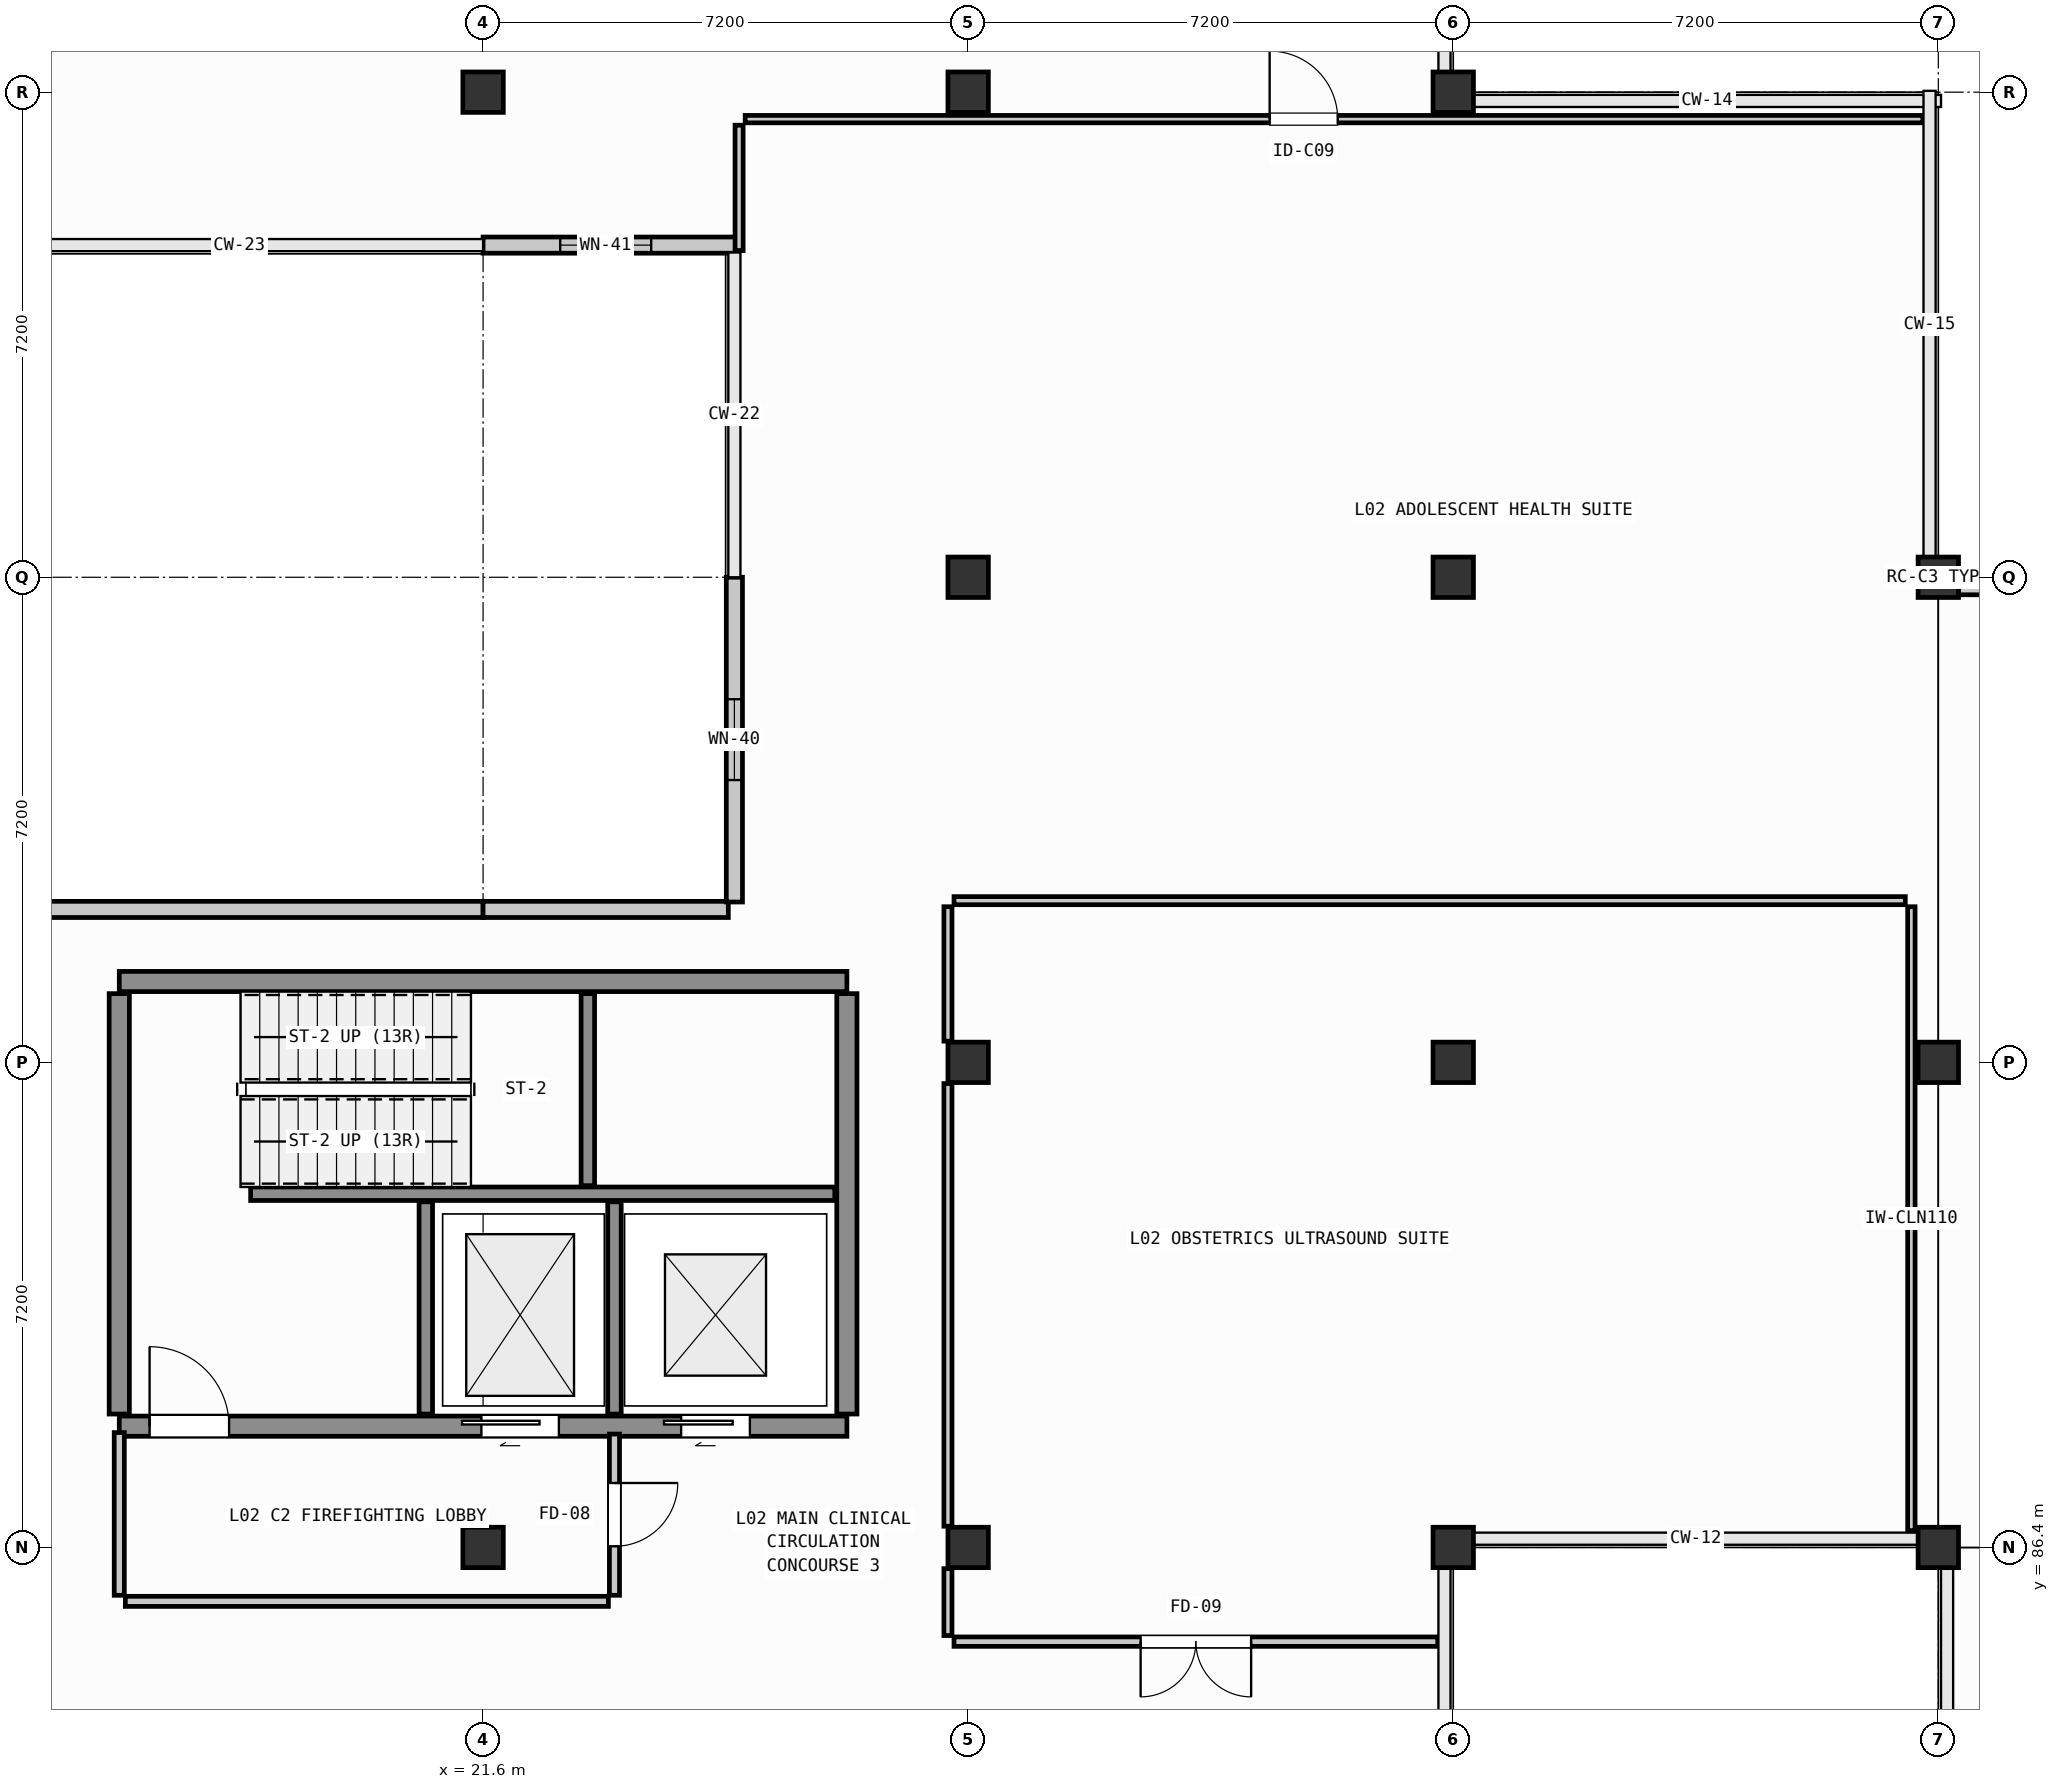
"""IFC4 building model, lengths in metres.
Left out: names, types, materials, properties, quantities, classifications, styles, units other than length and angle.
Written with IfcOpenShell. Run it as: python <this file> out.ifc"""

import sys

from ifc_helpers import new_model, si_unit, direction, frame, frame_2d, origin, origin_2d, place, context, subcontext, project, spatial, rectangle, extrude, element, fill, save


model = new_model("IFC4")
c1 = context("Model", 3, precision=1e-05, world=origin(), true_north=direction((0.0, 1.0)))
c2 = subcontext(c1, "Body", "Model", "MODEL_VIEW")
j1 = project(units=[si_unit("LENGTHUNIT", "METRE"), si_unit("PLANEANGLEUNIT", "RADIAN")], contexts=[c1])
p1 = place(None, origin())
s1 = spatial("IfcSite", under=j1, at=p1, CompositionType="ELEMENT")
p2 = place(p1, origin())
s2 = spatial("IfcBuilding", under=s1, at=p2, CompositionType="ELEMENT")
p3 = place(p2, frame((0.0, 0.0, 4.8)))
s3 = spatial("IfcBuildingStorey", under=s2, at=p3, CompositionType="ELEMENT", Elevation=4.8)
for number, where, z_axis, x_axis in (
    (1, (21.6, 86.4, 0.0), (0.0, 0.0, 1.0), (1.0, 0.0, 0.0)),
    (2, (21.6, 108.0, 0.0), (0.0, 0.0, 1.0), (1.0, 0.0, 0.0)),
    (3, (28.8, 86.4, 0.0), (0.0, 0.0, 1.0), (1.0, 0.0, 0.0)),
    (4, (28.8, 93.6, 0.0), (0.0, 0.0, 1.0), (1.0, 0.0, 0.0)),
    (5, (28.8, 100.8, 0.0), (0.0, 0.0, 1.0), (1.0, 0.0, 0.0)),
    (6, (28.8, 108.0, 0.0), (0.0, 0.0, 1.0), (1.0, 0.0, 0.0)),
    (7, (36.0, 86.4, 0.0), (0.0, 0.0, 1.0), (1.0, 0.0, 0.0)),
    (8, (36.0, 93.6, 0.0), (0.0, 0.0, 1.0), (1.0, 0.0, 0.0)),
    (9, (36.0, 100.8, 0.0), (0.0, 0.0, 1.0), (1.0, 0.0, 0.0)),
    (10, (36.0, 108.0, 0.0), (0.0, 0.0, 1.0), (1.0, 0.0, 0.0)),
    (11, (43.2, 86.4, 0.0), (0.0, 0.0, 1.0), (1.0, 0.0, 0.0)),
    (12, (43.2, 93.6, 0.0), (0.0, 0.0, 1.0), (1.0, 0.0, 0.0)),
    (13, (43.2, 100.8, 0.0), (0.0, 0.0, 1.0), (1.0, 0.0, 0.0)),
):
    element("IfcColumn", number, at=place(p3, frame(where, z_axis=z_axis, x_axis=x_axis)), inside=s3, PredefinedType="COLUMN", context=c2, shape_type="SweptSolid", body=[
        extrude(rectangle(XDim=0.6, YDim=0.6, at=origin_2d()), origin(), (0.0, 0.0, 1.0), 4.2),
    ])
p4 = place(p3, frame((43.495, 100.67, 0.0), z_axis=(0.0, 0.0, 1.0), x_axis=(1.0, 0.0, 0.0)))
e14 = element("IfcWall", 14, at=p4, inside=s3, PredefinedType="SOLIDWALL", context=c2, shape_type="SweptSolid", body=[
    extrude(rectangle(XDim=6.66, YDim=0.26, at=frame_2d((3.33, 0.0))), origin(), (0.0, 0.0, 1.0), 3.0),
])
p5 = place(p4, frame((1.555, 0.0, 2.1)))
e15 = element("IfcOpeningElement", 15, at=p5, cuts=e14, PredefinedType="OPENING", context=c2, shape_type="SweptSolid", body=[
    extrude(rectangle(XDim=1.35, YDim=0.65, at=frame_2d((0.675, 0.325))), frame((0.0, 0.14, 0.0), z_axis=(0.0, -1.0, 0.0), x_axis=(1.0, 0.0, 0.0)), (0.0, 0.0, 1.0), 0.28),
])
p6 = place(p3, frame((14.36, 95.87, 0.0), z_axis=(0.0, 0.0, 1.0), x_axis=(1.0, 0.0, 0.0)))
e16 = element("IfcWall", 16, at=p6, inside=s3, PredefinedType="SOLIDWALL", context=c2, shape_type="SweptSolid", body=[
    extrude(rectangle(XDim=7.24, YDim=0.24, at=frame_2d((3.62, 0.0))), origin(), (0.0, 0.0, 1.0), 3.5),
])
p7 = place(p3, frame((21.6, 95.87, 0.0), z_axis=(0.0, 0.0, 1.0), x_axis=(1.0, 0.0, 0.0)))
e17 = element("IfcWall", 17, at=p7, inside=s3, PredefinedType="SOLIDWALL", context=c2, shape_type="SweptSolid", body=[
    extrude(rectangle(XDim=3.64, YDim=0.24, at=frame_2d((1.82, 0.0))), origin(), (0.0, 0.0, 1.0), 4.2),
])
p8 = place(p3, frame((25.33, 95.98, 0.0), z_axis=(0.0, 0.0, 1.0), x_axis=(0.0, 1.0, 0.0)))
e18 = element("IfcWall", 18, at=p8, inside=s3, PredefinedType="SOLIDWALL", context=c2, shape_type="SweptSolid", body=[
    extrude(rectangle(XDim=4.82, YDim=0.24, at=frame_2d((2.41, 0.0))), origin(), (0.0, 0.0, 1.0), 4.2),
])
p9 = place(p8, frame((1.81, 0.0, 0.95)))
e19 = element("IfcOpeningElement", 19, at=p9, cuts=e18, PredefinedType="OPENING", context=c2, shape_type="SweptSolid", body=[
    extrude(rectangle(XDim=1.2, YDim=1.55, at=frame_2d((0.6, 0.775))), frame((0.0, 0.13, 0.0), z_axis=(0.0, -1.0, 0.0), x_axis=(1.0, 0.0, 0.0)), (0.0, 0.0, 1.0), 0.26),
])
p10 = place(p3, frame((25.351, 105.73, 0.0), z_axis=(0.0, 0.0, 1.0), x_axis=(-1.0, 0.0, 0.0)))
e20 = element("IfcWall", 20, at=p10, inside=s3, PredefinedType="SOLIDWALL", context=c2, shape_type="SweptSolid", body=[
    extrude(rectangle(XDim=3.751, YDim=0.24, at=frame_2d((1.875, 0.0))), origin(), (0.0, 0.0, 1.0), 4.2),
])
p11 = place(p10, frame((1.256, 0.0, 0.95)))
e21 = element("IfcOpeningElement", 21, at=p11, cuts=e20, PredefinedType="OPENING", context=c2, shape_type="SweptSolid", body=[
    extrude(rectangle(XDim=1.35, YDim=1.55, at=frame_2d((0.675, 0.775))), frame((0.0, 0.13, 0.0), z_axis=(0.0, -1.0, 0.0), x_axis=(1.0, 0.0, 0.0)), (0.0, 0.0, 1.0), 0.26),
])
p12 = place(p3, frame((16.2, 88.2, 0.0), z_axis=(0.0, 0.0, 1.0), x_axis=(1.0, 0.0, 0.0)))
e22 = element("IfcWall", 22, at=p12, inside=s3, PredefinedType="SHEAR", context=c2, shape_type="SweptSolid", body=[
    extrude(rectangle(XDim=10.8, YDim=0.3, at=frame_2d((5.4, 0.0))), origin(), (0.0, 0.0, 1.0), 4.5),
])
p13 = place(p12, frame((0.45, 0.0, 0.0)))
e23 = element("IfcOpeningElement", 23, at=p13, cuts=e22, PredefinedType="OPENING", context=c2, shape_type="SweptSolid", body=[
    extrude(rectangle(XDim=1.18, YDim=2.16, at=frame_2d((0.59, 1.08))), frame((0.0, 0.16, 0.0), z_axis=(0.0, -1.0, 0.0), x_axis=(1.0, 0.0, 0.0)), (0.0, 0.0, 1.0), 0.32),
])
p14 = place(p12, frame((5.375, 0.0, 0.0)))
e24 = element("IfcOpeningElement", 24, at=p14, cuts=e22, PredefinedType="OPENING", context=c2, shape_type="SweptSolid", body=[
    extrude(rectangle(XDim=1.15, YDim=2.15, at=frame_2d((0.575, 1.075))), frame((0.0, 0.16, 0.0), z_axis=(0.0, -1.0, 0.0), x_axis=(1.0, 0.0, 0.0)), (0.0, 0.0, 1.0), 0.32),
])
p15 = place(p12, frame((8.34, 0.0, 0.0)))
e25 = element("IfcOpeningElement", 25, at=p15, cuts=e22, PredefinedType="OPENING", context=c2, shape_type="SweptSolid", body=[
    extrude(rectangle(XDim=1.02, YDim=2.12, at=frame_2d((0.51, 1.06))), frame((0.0, 0.16, 0.0), z_axis=(0.0, -1.0, 0.0), x_axis=(1.0, 0.0, 0.0)), (0.0, 0.0, 1.0), 0.32),
])
p16 = place(p3, frame((16.2, 94.8, 0.0), z_axis=(0.0, 0.0, 1.0), x_axis=(1.0, 0.0, 0.0)))
e26 = element("IfcWall", 26, at=p16, inside=s3, PredefinedType="SHEAR", context=c2, shape_type="SweptSolid", body=[
    extrude(rectangle(XDim=10.8, YDim=0.3, at=frame_2d((5.4, 0.0))), origin(), (0.0, 0.0, 1.0), 4.5),
])
for number, where, z_axis, x_axis in (
    (27, (16.2, 88.38, 0.0), (0.0, 0.0, 1.0), (0.0, 1.0, 0.0)),
    (28, (27.0, 88.38, 0.0), (0.0, 0.0, 1.0), (0.0, 1.0, 0.0)),
):
    element("IfcWall", number, at=place(p3, frame(where, z_axis=z_axis, x_axis=x_axis)), inside=s3, PredefinedType="SHEAR", context=c2, shape_type="SweptSolid", body=[
        extrude(rectangle(XDim=6.24, YDim=0.3, at=frame_2d((3.12, 0.0))), origin(), (0.0, 0.0, 1.0), 4.5),
    ])
p17 = place(p3, frame((18.15, 91.65, 0.0), z_axis=(0.0, 0.0, 1.0), x_axis=(1.0, 0.0, 0.0)))
e29 = element("IfcWall", 29, at=p17, inside=s3, PredefinedType="SHEAR", context=c2, shape_type="SweptSolid", body=[
    extrude(rectangle(XDim=8.67, YDim=0.2, at=frame_2d((4.335, 0.0))), origin(), (0.0, 0.0, 1.0), 4.5),
])
p18 = place(p3, frame((23.155, 91.77, 0.0), z_axis=(0.0, 0.0, 1.0), x_axis=(0.0, 1.0, 0.0)))
e30 = element("IfcWall", 30, at=p18, inside=s3, PredefinedType="SHEAR", context=c2, shape_type="SweptSolid", body=[
    extrude(rectangle(XDim=2.85, YDim=0.2, at=frame_2d((1.425, 0.0))), origin(), (0.0, 0.0, 1.0), 4.5),
])
for number, where, z_axis, x_axis in (
    (31, (20.75, 88.38, 0.0), (0.0, 0.0, 1.0), (0.0, 1.0, 0.0)),
    (32, (23.55, 88.38, 0.0), (0.0, 0.0, 1.0), (0.0, 1.0, 0.0)),
):
    element("IfcWall", number, at=place(p3, frame(where, z_axis=z_axis, x_axis=x_axis)), inside=s3, PredefinedType="SHEAR", context=c2, shape_type="SweptSolid", body=[
        extrude(rectangle(XDim=3.15, YDim=0.2, at=frame_2d((1.575, 0.0))), origin(), (0.0, 0.0, 1.0), 4.5),
    ])
p19 = place(p3, frame((16.2, 85.69, 0.0), z_axis=(0.0, 0.0, 1.0), x_axis=(0.0, 1.0, 0.0)))
e33 = element("IfcWall", 33, at=p19, inside=s3, PredefinedType="PARTITIONING", context=c2, shape_type="SweptSolid", body=[
    extrude(rectangle(XDim=2.415, YDim=0.15, at=frame_2d((1.208, 0.0))), origin(), (0.0, 0.0, 1.0), 3.4),
])
p20 = place(p3, frame((23.55, 88.083, 0.0), z_axis=(0.0, 0.0, 1.0), x_axis=(0.0, -1.0, 0.0)))
e34 = element("IfcWall", 34, at=p20, inside=s3, PredefinedType="PARTITIONING", context=c2, shape_type="SweptSolid", body=[
    extrude(rectangle(XDim=2.393, YDim=0.15, at=frame_2d((1.197, 0.0))), origin(), (0.0, 0.0, 1.0), 3.4),
])
p21 = place(p20, frame((0.727, 0.0, 0.0)))
e35 = element("IfcOpeningElement", 35, at=p21, cuts=e34, PredefinedType="OPENING", context=c2, shape_type="SweptSolid", body=[
    extrude(rectangle(XDim=0.94, YDim=2.1, at=frame_2d((0.47, 1.05))), frame((0.0, 0.085, 0.0), z_axis=(0.0, -1.0, 0.0), x_axis=(1.0, 0.0, 0.0)), (0.0, 0.0, 1.0), 0.17),
])
p22 = place(p3, frame((23.46, 85.6, 0.0), z_axis=(0.0, 0.0, 1.0), x_axis=(-1.0, 0.0, 0.0)))
e36 = element("IfcWall", 36, at=p22, inside=s3, PredefinedType="PARTITIONING", context=c2, shape_type="SweptSolid", body=[
    extrude(rectangle(XDim=7.17, YDim=0.15, at=frame_2d((3.585, 0.0))), origin(), (0.0, 0.0, 1.0), 3.5),
])
p23 = place(p3, frame((28.59, 96.0, 0.0), z_axis=(0.0, 0.0, 1.0), x_axis=(1.0, 0.0, 0.0)))
e37 = element("IfcWall", 37, at=p23, inside=s3, PredefinedType="PARTITIONING", context=c2, shape_type="SweptSolid", body=[
    extrude(rectangle(XDim=14.12, YDim=0.12, at=frame_2d((7.06, 0.0))), origin(), (0.0, 0.0, 1.0), 3.5),
])
p24 = place(p3, frame((42.8, 95.91, 0.0), z_axis=(0.0, 0.0, 1.0), x_axis=(0.0, -1.0, 0.0)))
e38 = element("IfcWall", 38, at=p24, inside=s3, PredefinedType="PARTITIONING", context=c2, shape_type="SweptSolid", body=[
    extrude(rectangle(XDim=9.26, YDim=0.11, at=frame_2d((4.63, 0.0))), origin(), (0.0, 0.0, 1.0), 3.0),
])
p25 = place(p3, frame((35.77, 85.002, 0.0), z_axis=(0.0, 0.0, 1.0), x_axis=(-1.0, 0.0, 0.0)))
e39 = element("IfcWall", 39, at=p25, inside=s3, PredefinedType="PARTITIONING", context=c2, shape_type="SweptSolid", body=[
    extrude(rectangle(XDim=7.18, YDim=0.14, at=frame_2d((3.59, 0.0))), origin(), (0.0, 0.0, 1.0), 3.5),
])
p26 = place(p25, frame((2.77, 0.0, 0.0)))
e40 = element("IfcOpeningElement", 40, at=p26, cuts=e39, PredefinedType="OPENING", context=c2, shape_type="SweptSolid", body=[
    extrude(rectangle(XDim=1.64, YDim=2.24, at=frame_2d((0.82, 1.12))), frame((0.0, 0.08, 0.0), z_axis=(0.0, -1.0, 0.0), x_axis=(1.0, 0.0, 0.0)), (0.0, 0.0, 1.0), 0.16),
])
p27 = place(p3, frame((28.5, 85.092, 0.0), z_axis=(0.0, 0.0, 1.0), x_axis=(0.0, 1.0, 0.0)))
e41 = element("IfcWall", 41, at=p27, inside=s3, PredefinedType="PARTITIONING", context=c2, shape_type="SweptSolid", body=[
    extrude(rectangle(XDim=0.993, YDim=0.12, at=frame_2d((0.497, 0.0))), origin(), (0.0, 0.0, 1.0), 3.4),
])
p28 = place(p3, frame((28.5, 86.715, 0.0), z_axis=(0.0, 0.0, 1.0), x_axis=(0.0, 1.0, 0.0)))
e42 = element("IfcWall", 42, at=p28, inside=s3, PredefinedType="PARTITIONING", context=c2, shape_type="SweptSolid", body=[
    extrude(rectangle(XDim=6.57, YDim=0.12, at=frame_2d((3.285, 0.0))), origin(), (0.0, 0.0, 1.0), 3.4),
])
p29 = place(p3, frame((28.5, 93.915, 0.0), z_axis=(0.0, 0.0, 1.0), x_axis=(0.0, 1.0, 0.0)))
e43 = element("IfcWall", 43, at=p29, inside=s3, PredefinedType="PARTITIONING", context=c2, shape_type="SweptSolid", body=[
    extrude(rectangle(XDim=1.995, YDim=0.12, at=frame_2d((0.998, 0.0))), origin(), (0.0, 0.0, 1.0), 3.5),
])
p30 = place(p3, frame((25.4, 105.649, 0.0), z_axis=(0.0, 0.0, 1.0), x_axis=(0.0, 1.0, 0.0)))
e44 = element("IfcWall", 44, at=p30, inside=s3, PredefinedType="PARTITIONING", context=c2, shape_type="SweptSolid", body=[
    extrude(rectangle(XDim=1.861, YDim=0.12, at=frame_2d((0.93, 0.0))), origin(), (0.0, 0.0, 1.0), 4.2),
])
p31 = place(p3, frame((25.49, 107.6, 0.0), z_axis=(0.0, 0.0, 1.0), x_axis=(1.0, 0.0, 0.0)))
e45 = element("IfcWall", 45, at=p31, inside=s3, PredefinedType="PARTITIONING", context=c2, shape_type="SweptSolid", body=[
    extrude(rectangle(XDim=17.48, YDim=0.11, at=frame_2d((8.74, 0.0))), origin(), (0.0, 0.0, 1.0), 3.4),
])
p32 = place(p31, frame((7.785, 0.0, 0.0)))
e46 = element("IfcOpeningElement", 46, at=p32, cuts=e45, PredefinedType="OPENING", context=c2, shape_type="SweptSolid", body=[
    extrude(rectangle(XDim=1.01, YDim=2.24, at=frame_2d((0.505, 1.12))), frame((0.0, 0.065, 0.0), z_axis=(0.0, -1.0, 0.0), x_axis=(1.0, 0.0, 0.0)), (0.0, 0.0, 1.0), 0.13),
])
p33 = place(p9, origin())
e47 = element("IfcWindow", 47, at=p33, inside=s3, PartitioningType="SINGLE_PANEL", PredefinedType="WINDOW", context=c2, shape_type="SweptSolid", body=[
    extrude(rectangle(XDim=1.2, YDim=1.55, at=frame_2d((0.6, 0.775))), frame((0.0, 0.03, 0.0), z_axis=(0.0, -1.0, 0.0), x_axis=(1.0, 0.0, 0.0)), (0.0, 0.0, 1.0), 0.06),
])
fill(e19, e47)
p34 = place(p11, origin())
e48 = element("IfcWindow", 48, at=p34, inside=s3, PartitioningType="SINGLE_PANEL", PredefinedType="WINDOW", context=c2, shape_type="SweptSolid", body=[
    extrude(rectangle(XDim=1.35, YDim=1.55, at=frame_2d((0.675, 0.775))), frame((0.0, 0.03, 0.0), z_axis=(0.0, -1.0, 0.0), x_axis=(1.0, 0.0, 0.0)), (0.0, 0.0, 1.0), 0.06),
])
fill(e21, e48)
p35 = place(p13, origin())
e49 = element("IfcDoor", 49, at=p35, inside=s3, OperationType="SINGLE_SWING_LEFT", PredefinedType="DOOR", context=c2, shape_type="SweptSolid", body=[
    extrude(rectangle(XDim=1.18, YDim=2.16, at=frame_2d((0.59, 1.08))), frame((0.0, 0.025, 0.0), z_axis=(0.0, -1.0, 0.0), x_axis=(1.0, 0.0, 0.0)), (0.0, 0.0, 1.0), 0.05),
])
fill(e23, e49)
p36 = place(p14, origin())
e50 = element("IfcDoor", 50, at=p36, inside=s3, OperationType="DOUBLE_DOOR_SLIDING", PredefinedType="DOOR", context=c2, shape_type="SweptSolid", body=[
    extrude(rectangle(XDim=1.15, YDim=2.15, at=frame_2d((0.575, 1.075))), frame((0.0, 0.025, 0.0), z_axis=(0.0, -1.0, 0.0), x_axis=(1.0, 0.0, 0.0)), (0.0, 0.0, 1.0), 0.05),
])
fill(e24, e50)
p37 = place(p15, origin())
e51 = element("IfcDoor", 51, at=p37, inside=s3, OperationType="SLIDING_TO_LEFT", PredefinedType="DOOR", context=c2, shape_type="SweptSolid", body=[
    extrude(rectangle(XDim=1.02, YDim=2.12, at=frame_2d((0.51, 1.06))), frame((0.0, 0.025, 0.0), z_axis=(0.0, -1.0, 0.0), x_axis=(1.0, 0.0, 0.0)), (0.0, 0.0, 1.0), 0.05),
])
fill(e25, e51)
p38 = place(p21, origin())
e52 = element("IfcDoor", 52, at=p38, inside=s3, OperationType="SINGLE_SWING_LEFT", PredefinedType="DOOR", context=c2, shape_type="SweptSolid", body=[
    extrude(rectangle(XDim=0.94, YDim=2.1, at=frame_2d((0.47, 1.05))), frame((0.0, 0.025, 0.0), z_axis=(0.0, -1.0, 0.0), x_axis=(1.0, 0.0, 0.0)), (0.0, 0.0, 1.0), 0.05),
])
fill(e35, e52)
p39 = place(p26, origin())
e53 = element("IfcDoor", 53, at=p39, inside=s3, OperationType="DOUBLE_DOOR_SINGLE_SWING", PredefinedType="DOOR", context=c2, shape_type="SweptSolid", body=[
    extrude(rectangle(XDim=1.64, YDim=2.24, at=frame_2d((0.82, 1.12))), frame((0.0, 0.025, 0.0), z_axis=(0.0, -1.0, 0.0), x_axis=(1.0, 0.0, 0.0)), (0.0, 0.0, 1.0), 0.05),
])
fill(e40, e53)
p40 = place(p32, origin())
e54 = element("IfcDoor", 54, at=p40, inside=s3, OperationType="SINGLE_SWING_RIGHT", PredefinedType="DOOR", context=c2, shape_type="SweptSolid", body=[
    extrude(rectangle(XDim=1.01, YDim=2.24, at=frame_2d((0.505, 1.12))), frame((0.0, 0.025, 0.0), z_axis=(0.0, -1.0, 0.0), x_axis=(1.0, 0.0, 0.0)), (0.0, 0.0, 1.0), 0.05),
])
fill(e46, e54)
save(model, sys.argv[1])
